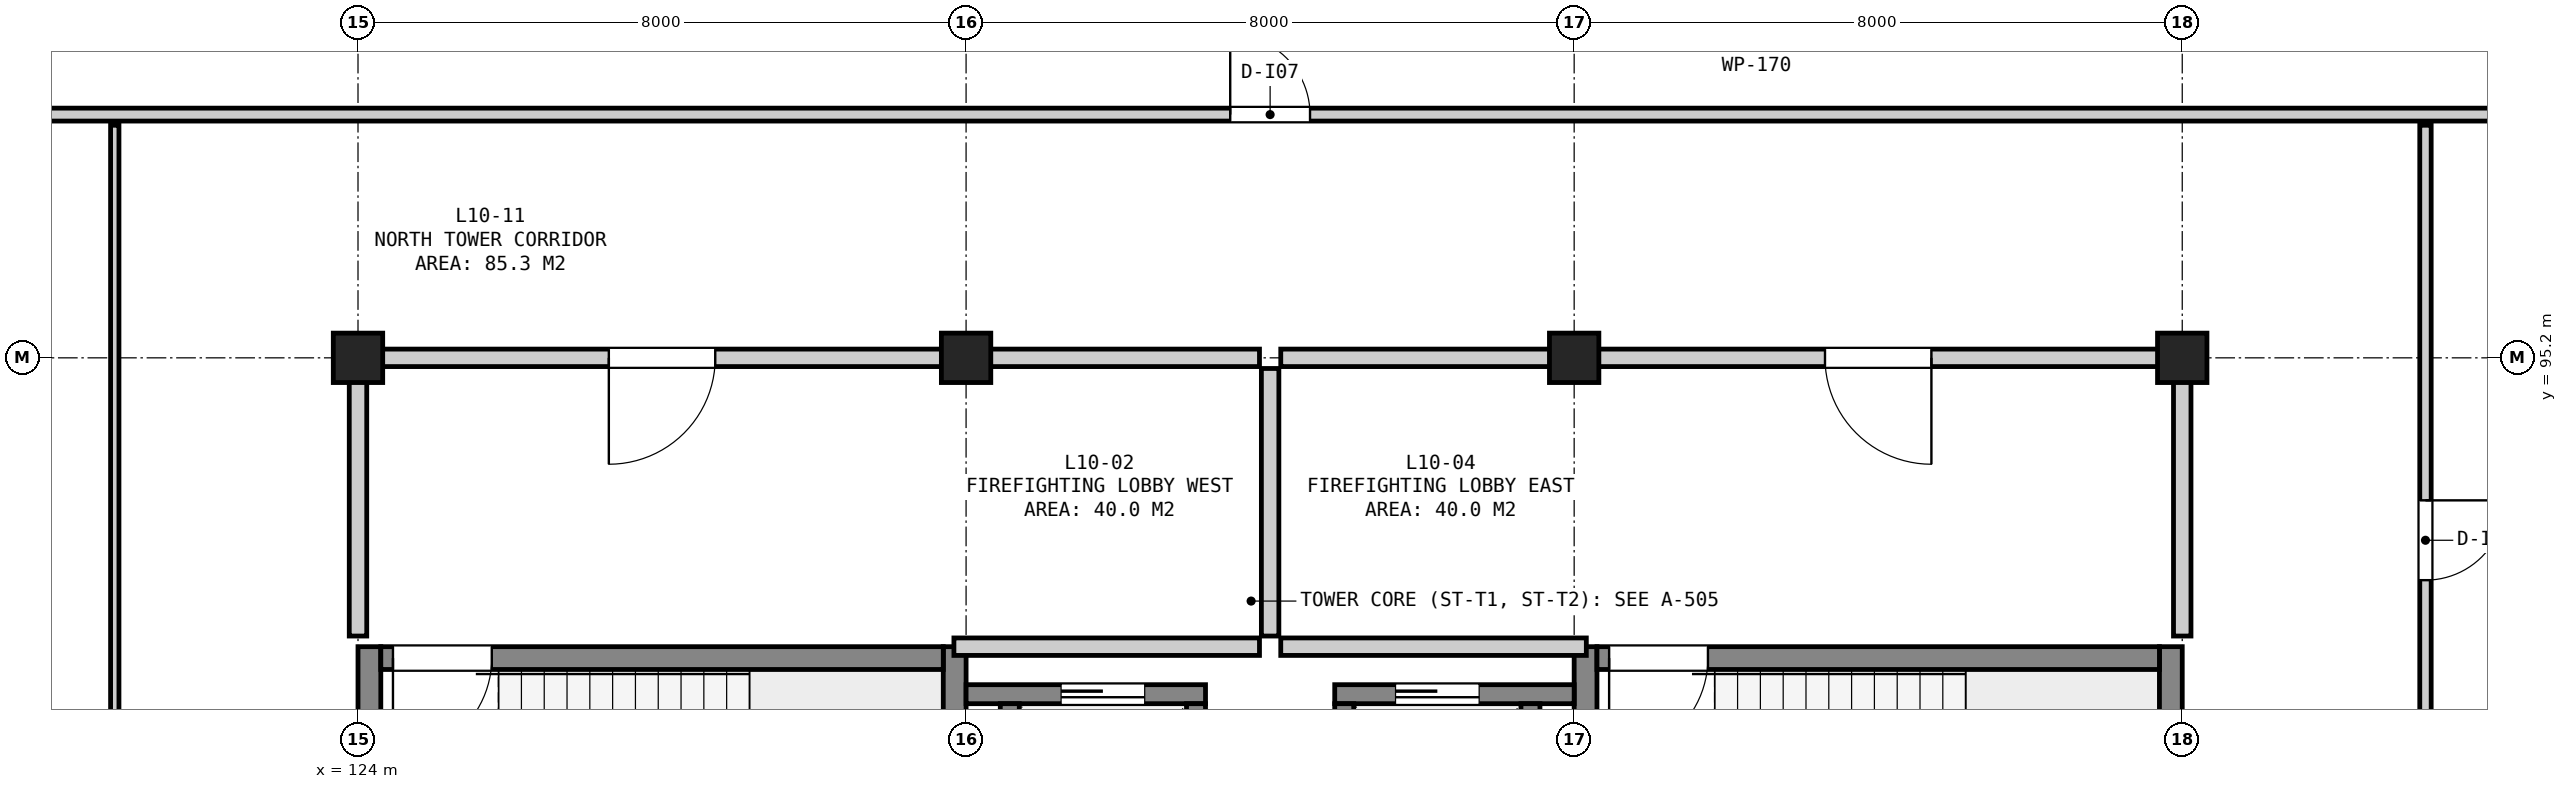
"""IFC4 building model, lengths in metres.
Left out: names, types, materials, properties, quantities, classifications, styles, units other than length and angle.
Written with IfcOpenShell. Run it as: python <this file> out.ifc"""

import sys

from ifc_helpers import new_model, si_unit, direction, frame, frame_2d, origin, origin_2d, place, context, subcontext, project, spatial, rectangle, extrude, element, fill, save


model = new_model("IFC4")
c1 = context("Model", 3, precision=1e-05, world=origin(), true_north=direction((0.0, 1.0)))
c2 = subcontext(c1, "Body", "Model", "MODEL_VIEW")
j1 = project(units=[si_unit("LENGTHUNIT", "METRE"), si_unit("PLANEANGLEUNIT", "RADIAN")], contexts=[c1])
p1 = place(None, origin())
s1 = spatial("IfcSite", under=j1, at=p1, CompositionType="ELEMENT")
p2 = place(p1, origin())
s2 = spatial("IfcBuilding", under=s1, at=p2, CompositionType="ELEMENT")
p3 = place(p2, frame((0.0, 0.0, 43.3)))
s3 = spatial("IfcBuildingStorey", under=s2, at=p3, CompositionType="ELEMENT", Elevation=43.3)
for number, where, z_axis, x_axis in (
    (1, (124.0, 95.2, 0.0), (0.0, 0.0, 1.0), (1.0, 0.0, 0.0)),
    (2, (132.0, 95.2, 0.0), (0.0, 0.0, 1.0), (1.0, 0.0, 0.0)),
    (3, (140.0, 95.2, 0.0), (0.0, 0.0, 1.0), (1.0, 0.0, 0.0)),
    (4, (148.0, 95.2, 0.0), (0.0, 0.0, 1.0), (1.0, 0.0, 0.0)),
):
    element("IfcColumn", number, at=place(p3, frame(where, z_axis=z_axis, x_axis=x_axis)), inside=s3, PredefinedType="COLUMN", context=c2, shape_type="SweptSolid", body=[
        extrude(rectangle(XDim=0.65, YDim=0.65, at=origin_2d()), origin(), (0.0, 0.0, 1.0), 3.8),
    ])
for number, where, z_axis, x_axis in (
    (5, (124.15, 87.2, 0.0), (0.0, 0.0, 1.0), (0.0, 1.0, 0.0)),
    (6, (131.85, 87.2, 0.0), (0.0, 0.0, 1.0), (0.0, 1.0, 0.0)),
):
    element("IfcWall", number, at=place(p3, frame(where, z_axis=z_axis, x_axis=x_axis)), inside=s3, PredefinedType="SHEAR", context=c2, shape_type="SweptSolid", body=[
        extrude(rectangle(XDim=4.2, YDim=0.3, at=frame_2d((2.1, 0.0))), origin(), (0.0, 0.0, 1.0), 3.52),
    ])
p4 = place(p3, frame((124.3, 91.25, 0.0), z_axis=(0.0, 0.0, 1.0), x_axis=(1.0, 0.0, 0.0)))
e7 = element("IfcWall", 7, at=p4, inside=s3, PredefinedType="SHEAR", context=c2, shape_type="SweptSolid", body=[
    extrude(rectangle(XDim=7.4, YDim=0.3, at=frame_2d((3.7, 0.0))), origin(), (0.0, 0.0, 1.0), 3.52),
])
p5 = place(p4, frame((0.16, 0.0, 0.0)))
e8 = element("IfcOpeningElement", 8, at=p5, cuts=e7, PredefinedType="OPENING", context=c2, shape_type="SweptSolid", body=[
    extrude(rectangle(XDim=1.3, YDim=2.18, at=frame_2d((0.65, 1.09))), frame((0.0, 0.162, 0.0), z_axis=(0.0, -1.0, 0.0), x_axis=(1.0, 0.0, 0.0)), (0.0, 0.0, 1.0), 0.324),
])
for number, where, z_axis, x_axis in (
    (9, (140.15, 87.2, 0.0), (0.0, 0.0, 1.0), (0.0, 1.0, 0.0)),
    (10, (147.85, 87.2, 0.0), (0.0, 0.0, 1.0), (0.0, 1.0, 0.0)),
):
    element("IfcWall", number, at=place(p3, frame(where, z_axis=z_axis, x_axis=x_axis)), inside=s3, PredefinedType="SHEAR", context=c2, shape_type="SweptSolid", body=[
        extrude(rectangle(XDim=4.2, YDim=0.3, at=frame_2d((2.1, 0.0))), origin(), (0.0, 0.0, 1.0), 3.52),
    ])
p6 = place(p3, frame((140.3, 91.25, 0.0), z_axis=(0.0, 0.0, 1.0), x_axis=(1.0, 0.0, 0.0)))
e11 = element("IfcWall", 11, at=p6, inside=s3, PredefinedType="SHEAR", context=c2, shape_type="SweptSolid", body=[
    extrude(rectangle(XDim=7.4, YDim=0.3, at=frame_2d((3.7, 0.0))), origin(), (0.0, 0.0, 1.0), 3.52),
])
p7 = place(p6, frame((0.16, 0.0, 0.0)))
e12 = element("IfcOpeningElement", 12, at=p7, cuts=e11, PredefinedType="OPENING", context=c2, shape_type="SweptSolid", body=[
    extrude(rectangle(XDim=1.3, YDim=2.18, at=frame_2d((0.65, 1.09))), frame((0.0, 0.162, 0.0), z_axis=(0.0, -1.0, 0.0), x_axis=(1.0, 0.0, 0.0)), (0.0, 0.0, 1.0), 0.324),
])
p8 = place(p3, frame((132.0, 90.775, 0.0), z_axis=(0.0, 0.0, 1.0), x_axis=(1.0, 0.0, 0.0)))
e13 = element("IfcWall", 13, at=p8, inside=s3, PredefinedType="SHEAR", context=c2, shape_type="SweptSolid", body=[
    extrude(rectangle(XDim=3.15, YDim=0.25, at=frame_2d((1.575, 0.0))), origin(), (0.0, 0.0, 1.0), 3.52),
])
p9 = place(p8, frame((1.25, 0.0, 0.0)))
e14 = element("IfcOpeningElement", 14, at=p9, cuts=e13, PredefinedType="OPENING", context=c2, shape_type="SweptSolid", body=[
    extrude(rectangle(XDim=1.1, YDim=2.15, at=frame_2d((0.55, 1.075))), frame((0.0, 0.137, 0.0), z_axis=(0.0, -1.0, 0.0), x_axis=(1.0, 0.0, 0.0)), (0.0, 0.0, 1.0), 0.274),
])
for number, where, z_axis, x_axis in (
    (15, (132.575, 87.75, 0.0), (0.0, 0.0, 1.0), (0.0, 1.0, 0.0)),
    (16, (135.025, 87.75, 0.0), (0.0, 0.0, 1.0), (0.0, 1.0, 0.0)),
):
    element("IfcWall", number, at=place(p3, frame(where, z_axis=z_axis, x_axis=x_axis)), inside=s3, PredefinedType="SHEAR", context=c2, shape_type="SweptSolid", body=[
        extrude(rectangle(XDim=2.9, YDim=0.25, at=frame_2d((1.45, 0.0))), origin(), (0.0, 0.0, 1.0), 3.52),
    ])
p10 = place(p3, frame((136.85, 90.775, 0.0), z_axis=(0.0, 0.0, 1.0), x_axis=(1.0, 0.0, 0.0)))
e17 = element("IfcWall", 17, at=p10, inside=s3, PredefinedType="SHEAR", context=c2, shape_type="SweptSolid", body=[
    extrude(rectangle(XDim=3.15, YDim=0.25, at=frame_2d((1.575, 0.0))), origin(), (0.0, 0.0, 1.0), 3.52),
])
p11 = place(p10, frame((0.8, 0.0, 0.0)))
e18 = element("IfcOpeningElement", 18, at=p11, cuts=e17, PredefinedType="OPENING", context=c2, shape_type="SweptSolid", body=[
    extrude(rectangle(XDim=1.1, YDim=2.15, at=frame_2d((0.55, 1.075))), frame((0.0, 0.137, 0.0), z_axis=(0.0, -1.0, 0.0), x_axis=(1.0, 0.0, 0.0)), (0.0, 0.0, 1.0), 0.274),
])
for number, where, z_axis, x_axis in (
    (19, (136.975, 87.75, 0.0), (0.0, 0.0, 1.0), (0.0, 1.0, 0.0)),
    (20, (139.425, 87.75, 0.0), (0.0, 0.0, 1.0), (0.0, 1.0, 0.0)),
):
    element("IfcWall", number, at=place(p3, frame(where, z_axis=z_axis, x_axis=x_axis)), inside=s3, PredefinedType="SHEAR", context=c2, shape_type="SweptSolid", body=[
        extrude(rectangle(XDim=2.9, YDim=0.25, at=frame_2d((1.45, 0.0))), origin(), (0.0, 0.0, 1.0), 3.52),
    ])
p12 = place(p3, frame((131.84, 91.4, 0.0), z_axis=(0.0, 0.0, 1.0), x_axis=(1.0, 0.0, 0.0)))
e21 = element("IfcWall", 21, at=p12, inside=s3, PredefinedType="SOLIDWALL", context=c2, shape_type="SweptSolid", body=[
    extrude(rectangle(XDim=4.02, YDim=0.23, at=frame_2d((2.01, 0.0))), origin(), (0.0, 0.0, 1.0), 3.52),
])
p13 = place(p3, frame((124.14, 95.2, 0.0), z_axis=(0.0, 0.0, 1.0), x_axis=(1.0, 0.0, 0.0)))
e22 = element("IfcWall", 22, at=p13, inside=s3, PredefinedType="SOLIDWALL", context=c2, shape_type="SweptSolid", body=[
    extrude(rectangle(XDim=11.72, YDim=0.23, at=frame_2d((5.86, 0.0))), origin(), (0.0, 0.0, 1.0), 2.995),
])
p14 = place(p13, frame((3.16, 0.0, 0.0)))
e23 = element("IfcOpeningElement", 23, at=p14, cuts=e22, PredefinedType="OPENING", context=c2, shape_type="SweptSolid", body=[
    extrude(rectangle(XDim=1.4, YDim=2.2, at=frame_2d((0.7, 1.1))), frame((0.0, 0.127, 0.0), z_axis=(0.0, -1.0, 0.0), x_axis=(1.0, 0.0, 0.0)), (0.0, 0.0, 1.0), 0.254),
])
p15 = place(p3, frame((124.0, 91.54, 0.0), z_axis=(0.0, 0.0, 1.0), x_axis=(0.0, 1.0, 0.0)))
e24 = element("IfcWall", 24, at=p15, inside=s3, PredefinedType="SOLIDWALL", context=c2, shape_type="SweptSolid", body=[
    extrude(rectangle(XDim=3.52, YDim=0.23, at=frame_2d((1.76, 0.0))), origin(), (0.0, 0.0, 1.0), 2.645),
])
p16 = place(p3, frame((136.0, 91.54, 0.0), z_axis=(0.0, 0.0, 1.0), x_axis=(0.0, 1.0, 0.0)))
e25 = element("IfcWall", 25, at=p16, inside=s3, PredefinedType="SOLIDWALL", context=c2, shape_type="SweptSolid", body=[
    extrude(rectangle(XDim=3.52, YDim=0.23, at=frame_2d((1.76, 0.0))), origin(), (0.0, 0.0, 1.0), 3.52),
])
p17 = place(p3, frame((136.14, 91.4, 0.0), z_axis=(0.0, 0.0, 1.0), x_axis=(1.0, 0.0, 0.0)))
e26 = element("IfcWall", 26, at=p17, inside=s3, PredefinedType="SOLIDWALL", context=c2, shape_type="SweptSolid", body=[
    extrude(rectangle(XDim=4.02, YDim=0.23, at=frame_2d((2.01, 0.0))), origin(), (0.0, 0.0, 1.0), 3.52),
])
p18 = place(p3, frame((136.14, 95.2, 0.0), z_axis=(0.0, 0.0, 1.0), x_axis=(1.0, 0.0, 0.0)))
e27 = element("IfcWall", 27, at=p18, inside=s3, PredefinedType="SOLIDWALL", context=c2, shape_type="SweptSolid", body=[
    extrude(rectangle(XDim=11.72, YDim=0.23, at=frame_2d((5.86, 0.0))), origin(), (0.0, 0.0, 1.0), 2.995),
])
p19 = place(p18, frame((7.16, 0.0, 0.0)))
e28 = element("IfcOpeningElement", 28, at=p19, cuts=e27, PredefinedType="OPENING", context=c2, shape_type="SweptSolid", body=[
    extrude(rectangle(XDim=1.4, YDim=2.2, at=frame_2d((0.7, 1.1))), frame((0.0, 0.127, 0.0), z_axis=(0.0, -1.0, 0.0), x_axis=(1.0, 0.0, 0.0)), (0.0, 0.0, 1.0), 0.254),
])
p20 = place(p3, frame((148.0, 91.54, 0.0), z_axis=(0.0, 0.0, 1.0), x_axis=(0.0, 1.0, 0.0)))
e29 = element("IfcWall", 29, at=p20, inside=s3, PredefinedType="SOLIDWALL", context=c2, shape_type="SweptSolid", body=[
    extrude(rectangle(XDim=3.52, YDim=0.23, at=frame_2d((1.76, 0.0))), origin(), (0.0, 0.0, 1.0), 2.945),
])
p21 = place(p3, frame((116.985, 98.4, 0.0), z_axis=(0.0, 0.0, 1.0), x_axis=(1.0, 0.0, 0.0)))
e30 = element("IfcWall", 30, at=p21, inside=s3, PredefinedType="PARTITIONING", context=c2, shape_type="SweptSolid", body=[
    extrude(rectangle(XDim=50.83, YDim=0.17, at=frame_2d((25.415, 0.0))), origin(), (0.0, 0.0, 1.0), 3.52),
])
p22 = place(p21, frame((18.49, 0.0, 0.0)))
e31 = element("IfcOpeningElement", 31, at=p22, cuts=e30, PredefinedType="OPENING", context=c2, shape_type="SweptSolid", body=[
    extrude(rectangle(XDim=1.05, YDim=2.15, at=frame_2d((0.525, 1.075))), frame((0.0, 0.097, 0.0), z_axis=(0.0, -1.0, 0.0), x_axis=(1.0, 0.0, 0.0)), (0.0, 0.0, 1.0), 0.194),
])
p23 = place(p3, frame((151.2, 87.34, 0.0), z_axis=(0.0, 0.0, 1.0), x_axis=(0.0, 1.0, 0.0)))
e32 = element("IfcWall", 32, at=p23, inside=s3, PredefinedType="PARTITIONING", context=c2, shape_type="SweptSolid", body=[
    extrude(rectangle(XDim=10.92, YDim=0.15, at=frame_2d((5.46, 0.0))), origin(), (0.0, 0.0, 1.0), 3.52),
])
p24 = place(p23, frame((4.935, 0.0, 0.0)))
e33 = element("IfcOpeningElement", 33, at=p24, cuts=e32, PredefinedType="OPENING", context=c2, shape_type="SweptSolid", body=[
    extrude(rectangle(XDim=1.05, YDim=2.15, at=frame_2d((0.525, 1.075))), frame((0.0, 0.087, 0.0), z_axis=(0.0, -1.0, 0.0), x_axis=(1.0, 0.0, 0.0)), (0.0, 0.0, 1.0), 0.174),
])
p25 = place(p3, frame((120.8, 76.14, 0.0), z_axis=(0.0, 0.0, 1.0), x_axis=(0.0, 1.0, 0.0)))
e34 = element("IfcWall", 34, at=p25, inside=s3, PredefinedType="PARTITIONING", context=c2, shape_type="SweptSolid", body=[
    extrude(rectangle(XDim=22.12, YDim=0.11, at=frame_2d((11.06, 0.0))), origin(), (0.0, 0.0, 1.0), 3.52),
])
p26 = place(p25, frame((6.535, 0.0, 0.0)))
e35 = element("IfcOpeningElement", 35, at=p26, cuts=e34, PredefinedType="OPENING", context=c2, shape_type="SweptSolid", body=[
    extrude(rectangle(XDim=1.05, YDim=2.15, at=frame_2d((0.525, 1.075))), frame((0.0, 0.067, 0.0), z_axis=(0.0, -1.0, 0.0), x_axis=(1.0, 0.0, 0.0)), (0.0, 0.0, 1.0), 0.134),
])
p27 = place(p5, frame((1.3, 0.0, 0.0), z_axis=(0.0, 0.0, 1.0), x_axis=(-1.0, 0.0, 0.0)))
e36 = element("IfcDoor", 36, at=p27, inside=s3, OperationType="SINGLE_SWING_RIGHT", PredefinedType="DOOR", context=c2, shape_type="SweptSolid", body=[
    extrude(rectangle(XDim=1.3, YDim=2.18, at=frame_2d((0.65, 1.09))), frame((0.0, 0.025, 0.0), z_axis=(0.0, -1.0, 0.0), x_axis=(1.0, 0.0, 0.0)), (0.0, 0.0, 1.0), 0.05),
])
fill(e8, e36)
p28 = place(p7, frame((1.3, 0.0, 0.0), z_axis=(0.0, 0.0, 1.0), x_axis=(-1.0, 0.0, 0.0)))
e37 = element("IfcDoor", 37, at=p28, inside=s3, OperationType="SINGLE_SWING_RIGHT", PredefinedType="DOOR", context=c2, shape_type="SweptSolid", body=[
    extrude(rectangle(XDim=1.3, YDim=2.18, at=frame_2d((0.65, 1.09))), frame((0.0, 0.025, 0.0), z_axis=(0.0, -1.0, 0.0), x_axis=(1.0, 0.0, 0.0)), (0.0, 0.0, 1.0), 0.05),
])
fill(e12, e37)
p29 = place(p9, origin())
e38 = element("IfcDoor", 38, at=p29, inside=s3, OperationType="SLIDING_TO_LEFT", PredefinedType="DOOR", context=c2, shape_type="SweptSolid", body=[
    extrude(rectangle(XDim=1.1, YDim=2.15, at=frame_2d((0.55, 1.075))), frame((0.0, 0.025, 0.0), z_axis=(0.0, -1.0, 0.0), x_axis=(1.0, 0.0, 0.0)), (0.0, 0.0, 1.0), 0.05),
])
fill(e14, e38)
p30 = place(p11, origin())
e39 = element("IfcDoor", 39, at=p30, inside=s3, OperationType="SLIDING_TO_LEFT", PredefinedType="DOOR", context=c2, shape_type="SweptSolid", body=[
    extrude(rectangle(XDim=1.1, YDim=2.15, at=frame_2d((0.55, 1.075))), frame((0.0, 0.025, 0.0), z_axis=(0.0, -1.0, 0.0), x_axis=(1.0, 0.0, 0.0)), (0.0, 0.0, 1.0), 0.05),
])
fill(e18, e39)
p31 = place(p14, frame((1.4, 0.0, 0.0), z_axis=(0.0, 0.0, 1.0), x_axis=(-1.0, 0.0, 0.0)))
e40 = element("IfcDoor", 40, at=p31, inside=s3, OperationType="SINGLE_SWING_RIGHT", PredefinedType="DOOR", context=c2, shape_type="SweptSolid", body=[
    extrude(rectangle(XDim=1.4, YDim=2.2, at=frame_2d((0.7, 1.1))), frame((0.0, 0.025, 0.0), z_axis=(0.0, -1.0, 0.0), x_axis=(1.0, 0.0, 0.0)), (0.0, 0.0, 1.0), 0.05),
])
fill(e23, e40)
p32 = place(p19, frame((1.4, 0.0, 0.0), z_axis=(0.0, 0.0, 1.0), x_axis=(-1.0, 0.0, 0.0)))
e41 = element("IfcDoor", 41, at=p32, inside=s3, OperationType="SINGLE_SWING_LEFT", PredefinedType="DOOR", context=c2, shape_type="SweptSolid", body=[
    extrude(rectangle(XDim=1.4, YDim=2.2, at=frame_2d((0.7, 1.1))), frame((0.0, 0.025, 0.0), z_axis=(0.0, -1.0, 0.0), x_axis=(1.0, 0.0, 0.0)), (0.0, 0.0, 1.0), 0.05),
])
fill(e28, e41)
p33 = place(p22, origin())
e42 = element("IfcDoor", 42, at=p33, inside=s3, OperationType="SINGLE_SWING_LEFT", PredefinedType="DOOR", context=c2, shape_type="SweptSolid", body=[
    extrude(rectangle(XDim=1.05, YDim=2.15, at=frame_2d((0.525, 1.075))), frame((0.0, 0.025, 0.0), z_axis=(0.0, -1.0, 0.0), x_axis=(1.0, 0.0, 0.0)), (0.0, 0.0, 1.0), 0.05),
])
fill(e31, e42)
p34 = place(p24, frame((1.05, 0.0, 0.0), z_axis=(0.0, 0.0, 1.0), x_axis=(-1.0, 0.0, 0.0)))
e43 = element("IfcDoor", 43, at=p34, inside=s3, OperationType="SINGLE_SWING_LEFT", PredefinedType="DOOR", context=c2, shape_type="SweptSolid", body=[
    extrude(rectangle(XDim=1.05, YDim=2.15, at=frame_2d((0.525, 1.075))), frame((0.0, 0.025, 0.0), z_axis=(0.0, -1.0, 0.0), x_axis=(1.0, 0.0, 0.0)), (0.0, 0.0, 1.0), 0.05),
])
fill(e33, e43)
save(model, sys.argv[1])
